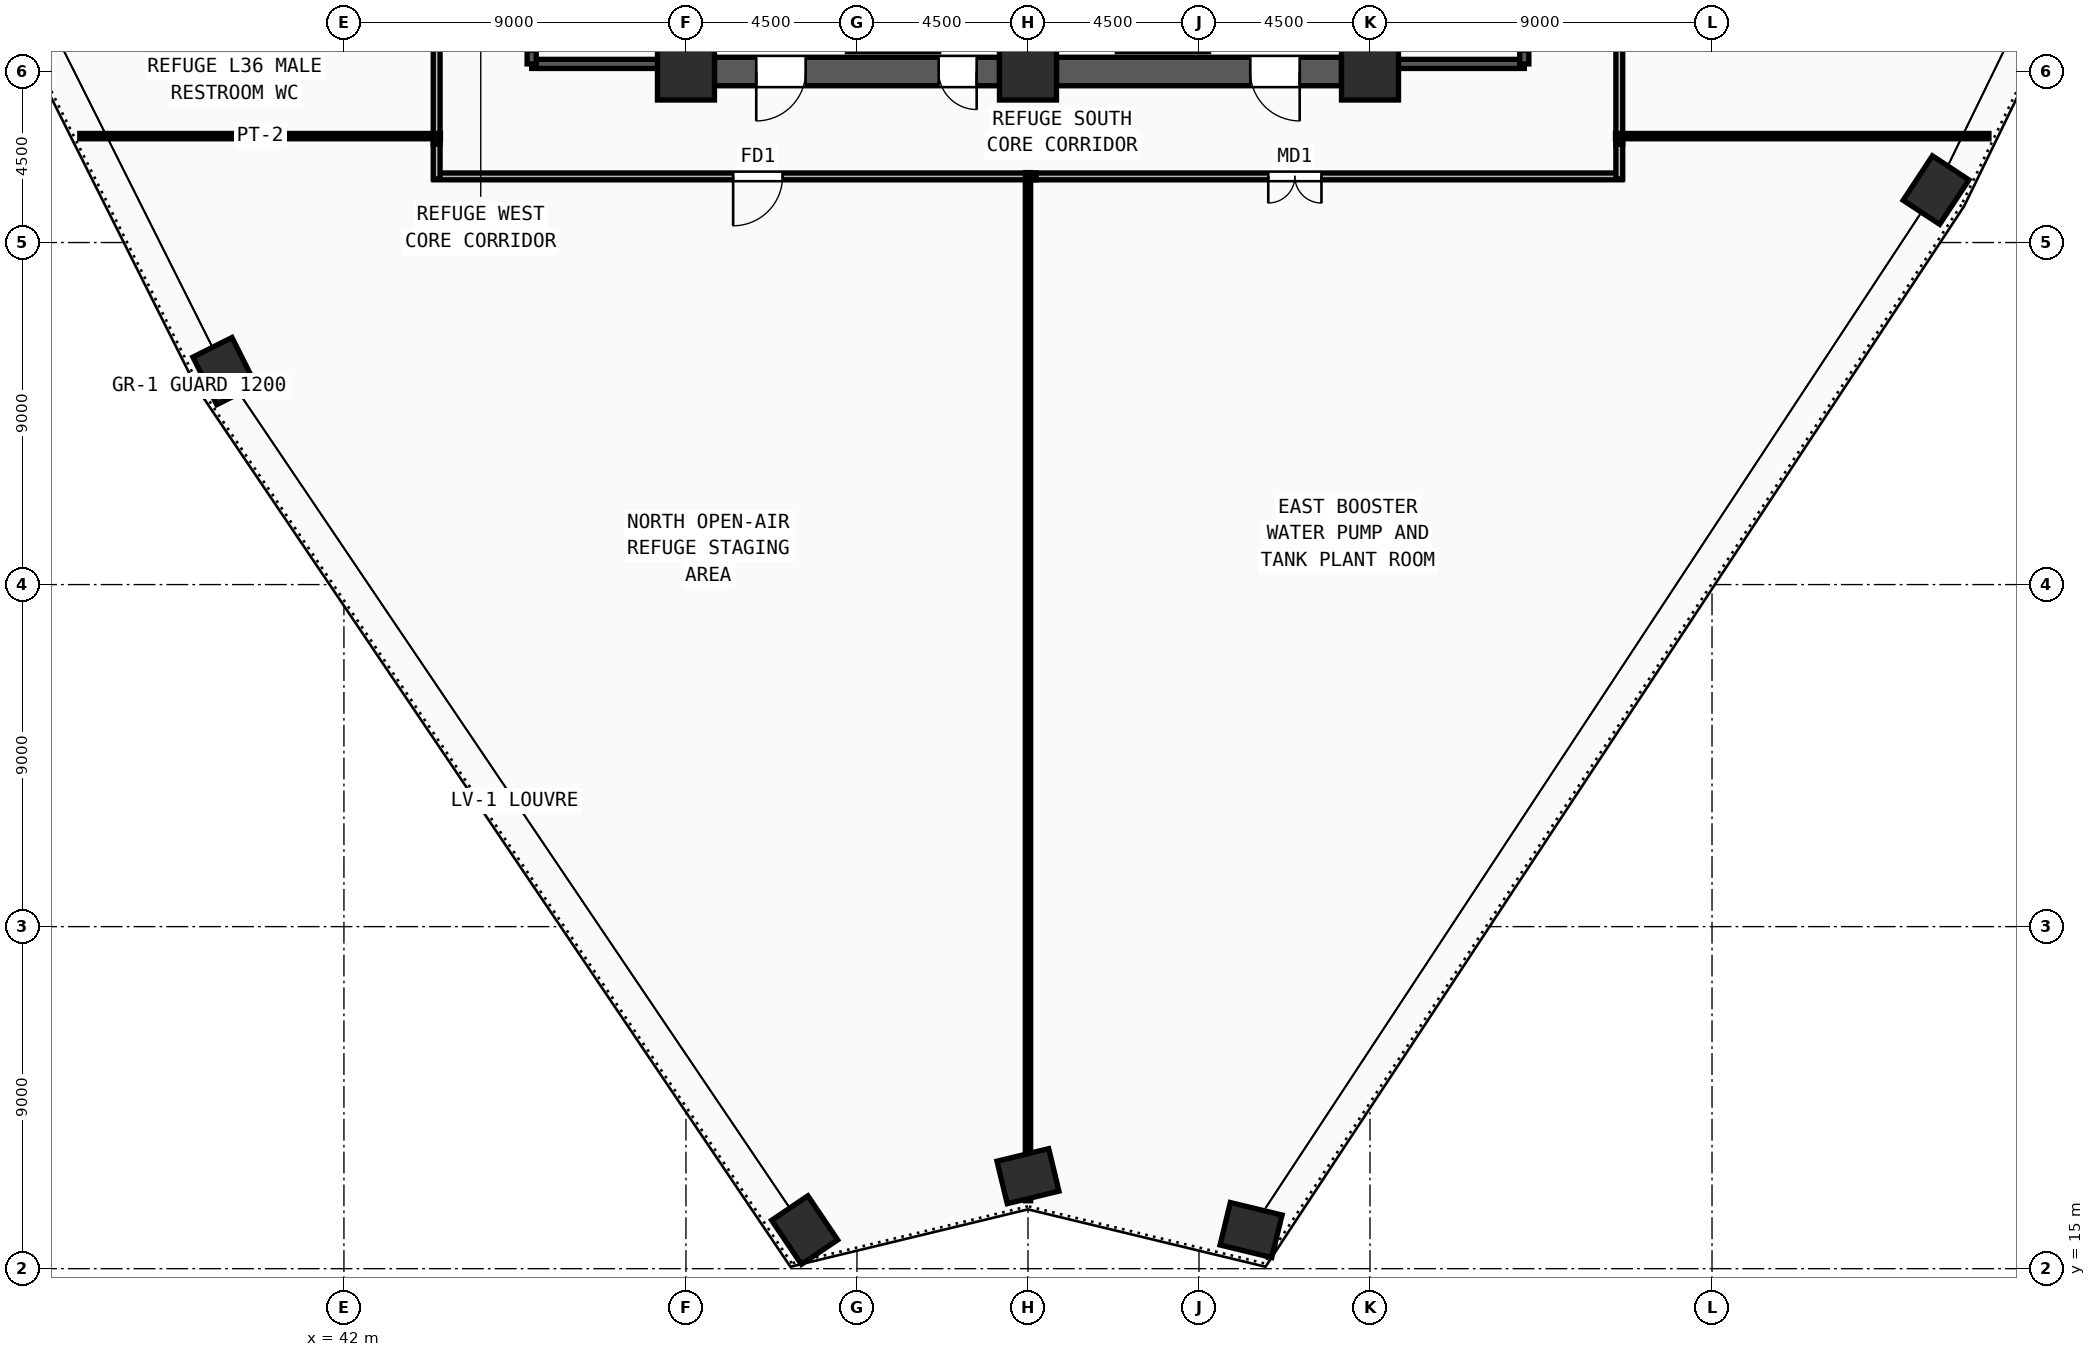
"""IFC4 building model, lengths in metres.
Left out: names, types, materials, properties, quantities, classifications, styles, units other than length and angle.
Written with IfcOpenShell. Run it as: python <this file> out.ifc"""

import sys

from ifc_helpers import new_model, si_unit, direction, frame, frame_2d, origin, origin_2d, place, context, subcontext, project, spatial, rectangle, extrude, source, transform, mapped, element, fill, save


model = new_model("IFC4")
c1 = context("Model", 3, precision=1e-05, world=origin(), true_north=direction((0.0, 1.0)))
c2 = subcontext(c1, "Body", "Model", "MODEL_VIEW")
j1 = project(units=[si_unit("LENGTHUNIT", "METRE"), si_unit("PLANEANGLEUNIT", "RADIAN")], contexts=[c1])
p1 = place(None, origin())
s1 = spatial("IfcSite", under=j1, at=p1, CompositionType="ELEMENT")
p2 = place(p1, origin())
s2 = spatial("IfcBuilding", under=s1, at=p2, CompositionType="ELEMENT")
p3 = place(p2, frame((0.0, 0.0, 139.5)))
s3 = spatial("IfcBuildingStorey", under=s2, at=p3, CompositionType="ELEMENT", Elevation=139.5)
m1 = source(origin(), c2, "Body", "SweptSolid", [
    extrude(rectangle(XDim=1.5, YDim=1.5, at=origin_2d()), origin(), (0.0, 0.0, 1.0), 4.5),
])
for number, where, z_axis, x_axis in (
    (1, (51.0, 46.5, 0.0), (0.0, 0.0, 1.0), (1.0, 0.0, 0.0)),
    (2, (60.0, 46.5, 0.0), (0.0, 0.0, 1.0), (1.0, 0.0, 0.0)),
    (3, (69.0, 46.5, 0.0), (0.0, 0.0, 1.0), (1.0, 0.0, 0.0)),
):
    element("IfcColumn", number, at=place(p3, frame(where, z_axis=z_axis, x_axis=x_axis)), inside=s3, PredefinedType="COLUMN", context=c2, shape_type="MappedRepresentation", body=[
        mapped(m1, transform((0.0, 0.0, 0.0), x_axis=(1.0, 0.0, 0.0), y_axis=(0.0, 1.0, 0.0), z_axis=(0.0, 0.0, 1.0), scale=1.0)),
    ])
m2 = source(origin(), c2, "Body", "SweptSolid", [
    extrude(rectangle(XDim=1.4, YDim=1.15, at=origin_2d()), origin(), (0.0, 0.0, 1.0), 4.5),
])
for number, where, z_axis, x_axis in (
    (4, (54.123, 16.015, 0.0), (0.0, 0.0, 1.0), (-0.56, 0.829, 0.0)),
    (5, (38.854, 38.617, 0.0), (0.0, 0.0, 1.0), (-0.448, 0.894, 0.0)),
    (6, (83.895, 43.38, 0.0), (0.0, 0.0, 1.0), (0.55, 0.835, 0.0)),
    (7, (65.87, 16.017, 0.0), (0.0, 0.0, 1.0), (-0.972, 0.235, 0.0)),
    (8, (60.0, 17.434, 0.0), (0.0, 0.0, 1.0), (0.972, 0.235, 0.0)),
):
    element("IfcColumn", number, at=place(p3, frame(where, z_axis=z_axis, x_axis=x_axis)), inside=s3, PredefinedType="COLUMN", context=c2, shape_type="MappedRepresentation", body=[
        mapped(m2, transform((0.0, 0.0, 0.0), x_axis=(1.0, 0.0, 0.0), y_axis=(0.0, 1.0, 0.0), z_axis=(0.0, 0.0, 1.0), scale=1.0)),
    ])
p4 = place(p3, frame((68.25, 46.5, 0.0), z_axis=(0.0, 0.0, 1.0), x_axis=(-1.0, 0.0, 0.0)))
e9 = element("IfcWall", 9, at=p4, inside=s3, PredefinedType="SHEAR", context=c2, shape_type="SweptSolid", body=[
    extrude(rectangle(XDim=7.5, YDim=0.75, at=frame_2d((3.75, 0.0))), origin(), (0.0, 0.0, 1.0), 4.32),
])
m3 = source(origin(), c2, "Body", "SweptSolid", [
    extrude(rectangle(XDim=1.3, YDim=2.2, at=frame_2d((0.65, 1.1))), frame((0.0, 0.385, 0.0), z_axis=(0.0, -1.0, 0.0), x_axis=(1.0, 0.0, 0.0)), (0.0, 0.0, 1.0), 0.77),
])
p5 = place(p4, frame((1.1, 0.0, 0.0)))
e10 = element("IfcOpeningElement", 10, at=p5, cuts=e9, PredefinedType="OPENING", context=c2, shape_type="MappedRepresentation", body=[
    mapped(m3, transform((0.0, 0.0, 0.0), x_axis=(1.0, 0.0, 0.0), y_axis=(0.0, 1.0, 0.0), z_axis=(0.0, 0.0, 1.0), scale=1.0)),
])
p6 = place(p3, frame((59.25, 46.5, 0.0), z_axis=(0.0, 0.0, 1.0), x_axis=(-1.0, 0.0, 0.0)))
e11 = element("IfcWall", 11, at=p6, inside=s3, PredefinedType="SHEAR", context=c2, shape_type="SweptSolid", body=[
    extrude(rectangle(XDim=7.5, YDim=0.75, at=frame_2d((3.75, 0.0))), origin(), (0.0, 0.0, 1.0), 4.32),
])
p7 = place(p6, frame((5.1, 0.0, 0.0)))
e12 = element("IfcOpeningElement", 12, at=p7, cuts=e11, PredefinedType="OPENING", context=c2, shape_type="MappedRepresentation", body=[
    mapped(m3, transform((0.0, 0.0, 0.0), x_axis=(1.0, 0.0, 0.0), y_axis=(0.0, 1.0, 0.0), z_axis=(0.0, 0.0, 1.0), scale=1.0)),
])
m4 = source(origin(), c2, "Body", "SweptSolid", [
    extrude(rectangle(XDim=1.0, YDim=2.2, at=frame_2d((0.5, 1.1))), frame((0.0, 0.385, 0.0), z_axis=(0.0, -1.0, 0.0), x_axis=(1.0, 0.0, 0.0)), (0.0, 0.0, 1.0), 0.77),
])
p8 = place(p6, frame((0.6, 0.0, 0.0)))
e13 = element("IfcOpeningElement", 13, at=p8, cuts=e11, PredefinedType="OPENING", context=c2, shape_type="MappedRepresentation", body=[
    mapped(m4, transform((0.0, 0.0, 0.0), x_axis=(1.0, 0.0, 0.0), y_axis=(0.0, 1.0, 0.0), z_axis=(0.0, 0.0, 1.0), scale=1.0)),
])
p9 = place(p3, frame((46.94, 46.7, 0.0), z_axis=(0.0, 0.0, 1.0), x_axis=(1.0, 0.0, 0.0)))
e14 = element("IfcWall", 14, at=p9, inside=s3, PredefinedType="SOLIDWALL", context=c2, shape_type="SweptSolid", body=[
    extrude(rectangle(XDim=3.44, YDim=0.24, at=frame_2d((1.72, 0.0))), origin(), (0.0, 0.0, 1.0), 4.32),
])
p10 = place(p3, frame((50.38, 46.7, 0.0), z_axis=(0.0, 0.0, 1.0), x_axis=(0.0, 1.0, 0.0)))
e15 = element("IfcWall", 15, at=p10, inside=s3, PredefinedType="SOLIDWALL", context=c2, shape_type="SweptSolid", body=[
    extrude(rectangle(XDim=7.82, YDim=0.24, at=frame_2d((3.91, 0.0))), origin(), (0.0, 0.0, 1.0), 4.32),
])
p11 = place(p3, frame((46.94, 54.52, 0.0), z_axis=(0.0, 0.0, 1.0), x_axis=(0.0, -1.0, 0.0)))
e16 = element("IfcWall", 16, at=p11, inside=s3, PredefinedType="SOLIDWALL", context=c2, shape_type="SweptSolid", body=[
    extrude(rectangle(XDim=7.82, YDim=0.24, at=frame_2d((3.91, 0.0))), origin(), (0.0, 0.0, 1.0), 4.32),
])
m5 = source(origin(), c2, "Body", "SweptSolid", [
    extrude(rectangle(XDim=1.2, YDim=2.2, at=frame_2d((0.6, 1.1))), frame((0.0, 0.13, 0.0), z_axis=(0.0, -1.0, 0.0), x_axis=(1.0, 0.0, 0.0)), (0.0, 0.0, 1.0), 0.26),
])
p12 = place(p11, frame((6.3, 0.0, 0.0)))
e17 = element("IfcOpeningElement", 17, at=p12, cuts=e16, PredefinedType="OPENING", context=c2, shape_type="MappedRepresentation", body=[
    mapped(m5, transform((0.0, 0.0, 0.0), x_axis=(1.0, 0.0, 0.0), y_axis=(0.0, 1.0, 0.0), z_axis=(0.0, 0.0, 1.0), scale=1.0)),
])
p13 = place(p3, frame((69.62, 46.7, 0.0), z_axis=(0.0, 0.0, 1.0), x_axis=(1.0, 0.0, 0.0)))
e18 = element("IfcWall", 18, at=p13, inside=s3, PredefinedType="SOLIDWALL", context=c2, shape_type="SweptSolid", body=[
    extrude(rectangle(XDim=3.44, YDim=0.24, at=frame_2d((1.72, 0.0))), origin(), (0.0, 0.0, 1.0), 4.32),
])
p14 = place(p3, frame((73.06, 46.7, 0.0), z_axis=(0.0, 0.0, 1.0), x_axis=(0.0, 1.0, 0.0)))
e19 = element("IfcWall", 19, at=p14, inside=s3, PredefinedType="SOLIDWALL", context=c2, shape_type="SweptSolid", body=[
    extrude(rectangle(XDim=7.82, YDim=0.24, at=frame_2d((3.91, 0.0))), origin(), (0.0, 0.0, 1.0), 4.32),
])
p15 = place(p14, frame((0.32, 0.0, 0.0)))
e20 = element("IfcOpeningElement", 20, at=p15, cuts=e19, PredefinedType="OPENING", context=c2, shape_type="MappedRepresentation", body=[
    mapped(m5, transform((0.0, 0.0, 0.0), x_axis=(1.0, 0.0, 0.0), y_axis=(0.0, 1.0, 0.0), z_axis=(0.0, 0.0, 1.0), scale=1.0)),
])
p16 = place(p3, frame((69.62, 54.52, 0.0), z_axis=(0.0, 0.0, 1.0), x_axis=(0.0, -1.0, 0.0)))
e21 = element("IfcWall", 21, at=p16, inside=s3, PredefinedType="SOLIDWALL", context=c2, shape_type="SweptSolid", body=[
    extrude(rectangle(XDim=7.82, YDim=0.24, at=frame_2d((3.91, 0.0))), origin(), (0.0, 0.0, 1.0), 4.32),
])
p17 = place(p3, frame((75.56, 67.015, 0.0), z_axis=(0.0, 0.0, 1.0), x_axis=(0.0, -1.0, 0.0)))
e22 = element("IfcWall", 22, at=p17, inside=s3, PredefinedType="PARTITIONING", context=c2, shape_type="SweptSolid", body=[
    extrude(rectangle(XDim=22.43, YDim=0.18, at=frame_2d((11.215, 0.0))), origin(), (0.0, 0.0, 1.0), 3.905),
])
m6 = source(origin(), c2, "Body", "SweptSolid", [
    extrude(rectangle(XDim=1.3, YDim=2.2, at=frame_2d((0.65, 1.1))), frame((0.0, 0.1, 0.0), z_axis=(0.0, -1.0, 0.0), x_axis=(1.0, 0.0, 0.0)), (0.0, 0.0, 1.0), 0.2),
])
p18 = place(p17, frame((10.565, 0.0, 0.0)))
e23 = element("IfcOpeningElement", 23, at=p18, cuts=e22, PredefinedType="OPENING", context=c2, shape_type="MappedRepresentation", body=[
    mapped(m6, transform((0.0, 0.0, 0.0), x_axis=(1.0, 0.0, 0.0), y_axis=(0.0, 1.0, 0.0), z_axis=(0.0, 0.0, 1.0), scale=1.0)),
])
p19 = place(p3, frame((60.215, 43.74, 0.0), z_axis=(0.0, 0.0, 1.0), x_axis=(-1.0, 0.0, 0.0)))
e24 = element("IfcWall", 24, at=p19, inside=s3, PredefinedType="PARTITIONING", context=c2, shape_type="SweptSolid", body=[
    extrude(rectangle(XDim=15.845, YDim=0.18, at=frame_2d((7.922, 0.0))), origin(), (0.0, 0.0, 1.0), 4.32),
])
p20 = place(p19, frame((6.673, 0.0, 0.0)))
e25 = element("IfcOpeningElement", 25, at=p20, cuts=e24, PredefinedType="OPENING", context=c2, shape_type="MappedRepresentation", body=[
    mapped(m6, transform((0.0, 0.0, 0.0), x_axis=(1.0, 0.0, 0.0), y_axis=(0.0, 1.0, 0.0), z_axis=(0.0, 0.0, 1.0), scale=1.0)),
])
p21 = place(p3, frame((75.63, 43.74, 0.0), z_axis=(0.0, 0.0, 1.0), x_axis=(-1.0, 0.0, 0.0)))
e26 = element("IfcWall", 26, at=p21, inside=s3, PredefinedType="PARTITIONING", context=c2, shape_type="SweptSolid", body=[
    extrude(rectangle(XDim=15.415, YDim=0.18, at=frame_2d((7.708, 0.0))), origin(), (0.0, 0.0, 1.0), 4.32),
])
m7 = source(origin(), c2, "Body", "SweptSolid", [
    extrude(rectangle(XDim=1.4, YDim=2.25, at=frame_2d((0.7, 1.125))), frame((0.0, 0.1, 0.0), z_axis=(0.0, -1.0, 0.0), x_axis=(1.0, 0.0, 0.0)), (0.0, 0.0, 1.0), 0.2),
])
p22 = place(p21, frame((7.907, 0.0, 0.0)))
e27 = element("IfcOpeningElement", 27, at=p22, cuts=e26, PredefinedType="OPENING", context=c2, shape_type="MappedRepresentation", body=[
    mapped(m7, transform((0.0, 0.0, 0.0), x_axis=(1.0, 0.0, 0.0), y_axis=(0.0, 1.0, 0.0), z_axis=(0.0, 0.0, 1.0), scale=1.0)),
])
p23 = place(p3, frame((44.44, 44.585, 0.0), z_axis=(0.0, 0.0, 1.0), x_axis=(0.0, 1.0, 0.0)))
e28 = element("IfcWall", 28, at=p23, inside=s3, PredefinedType="PARTITIONING", context=c2, shape_type="SweptSolid", body=[
    extrude(rectangle(XDim=2.755, YDim=0.18, at=frame_2d((1.377, 0.0))), origin(), (0.0, 0.0, 1.0), 4.32),
])
for number, where, z_axis, x_axis in (
    (29, (44.44, 43.67, 0.0), (0.0, 0.0, 1.0), (0.0, 1.0, 0.0)),
    (30, (75.56, 44.585, 0.0), (0.0, 0.0, 1.0), (0.0, -1.0, 0.0)),
):
    element("IfcWall", number, at=place(p3, frame(where, z_axis=z_axis, x_axis=x_axis)), inside=s3, PredefinedType="PARTITIONING", context=c2, shape_type="SweptSolid", body=[
        extrude(rectangle(XDim=0.915, YDim=0.18, at=frame_2d((0.458, 0.0))), origin(), (0.0, 0.0, 1.0), 4.32),
    ])
p24 = place(p3, frame((44.54, 44.8, 0.0), z_axis=(0.0, 0.0, 1.0), x_axis=(-1.0, 0.0, 0.0)))
e31 = element("IfcWall", 31, at=p24, inside=s3, PredefinedType="PARTITIONING", context=c2, shape_type="SweptSolid", body=[
    extrude(rectangle(XDim=9.49, YDim=0.14, at=frame_2d((4.745, 0.0))), origin(), (0.0, 0.0, 1.0), 4.32),
])
p25 = place(p3, frame((75.46, 44.8, 0.0), z_axis=(0.0, 0.0, 1.0), x_axis=(1.0, 0.0, 0.0)))
e32 = element("IfcWall", 32, at=p25, inside=s3, PredefinedType="PARTITIONING", context=c2, shape_type="SweptSolid", body=[
    extrude(rectangle(XDim=9.827, YDim=0.14, at=frame_2d((4.914, 0.0))), origin(), (0.0, 0.0, 1.0), 4.32),
])
p26 = place(p3, frame((60.0, 43.84, 0.0), z_axis=(0.0, 0.0, 1.0), x_axis=(0.0, -1.0, 0.0)))
e33 = element("IfcWall", 33, at=p26, inside=s3, PredefinedType="PARTITIONING", context=c2, shape_type="SweptSolid", body=[
    extrude(rectangle(XDim=27.054, YDim=0.14, at=frame_2d((13.527, 0.0))), origin(), (0.0, 0.0, 1.0), 4.32),
])
m8 = source(origin(), c2, "Body", "SweptSolid", [
    extrude(rectangle(XDim=1.3, YDim=2.2, at=frame_2d((0.65, 1.1))), frame((0.0, 0.025, 0.0), z_axis=(0.0, -1.0, 0.0), x_axis=(1.0, 0.0, 0.0)), (0.0, 0.0, 1.0), 0.05),
])
p27 = place(p7, origin())
e34 = element("IfcDoor", 34, at=p27, inside=s3, OperationType="SINGLE_SWING_RIGHT", PredefinedType="DOOR", context=c2, shape_type="MappedRepresentation", body=[
    mapped(m8, transform((0.0, 0.0, 0.0), x_axis=(1.0, 0.0, 0.0), y_axis=(0.0, 1.0, 0.0), z_axis=(0.0, 0.0, 1.0), scale=1.0)),
])
fill(e12, e34)
m9 = source(origin(), c2, "Body", "SweptSolid", [
    extrude(rectangle(XDim=1.0, YDim=2.2, at=frame_2d((0.5, 1.1))), frame((0.0, 0.025, 0.0), z_axis=(0.0, -1.0, 0.0), x_axis=(1.0, 0.0, 0.0)), (0.0, 0.0, 1.0), 0.05),
])
p28 = place(p8, origin())
e35 = element("IfcDoor", 35, at=p28, inside=s3, OperationType="SINGLE_SWING_LEFT", PredefinedType="DOOR", context=c2, shape_type="MappedRepresentation", body=[
    mapped(m9, transform((0.0, 0.0, 0.0), x_axis=(1.0, 0.0, 0.0), y_axis=(0.0, 1.0, 0.0), z_axis=(0.0, 0.0, 1.0), scale=1.0)),
])
fill(e13, e35)
p29 = place(p5, origin())
e36 = element("IfcDoor", 36, at=p29, inside=s3, OperationType="SINGLE_SWING_LEFT", PredefinedType="DOOR", context=c2, shape_type="MappedRepresentation", body=[
    mapped(m8, transform((0.0, 0.0, 0.0), x_axis=(1.0, 0.0, 0.0), y_axis=(0.0, 1.0, 0.0), z_axis=(0.0, 0.0, 1.0), scale=1.0)),
])
fill(e10, e36)
p30 = place(p20, origin())
e37 = element("IfcDoor", 37, at=p30, inside=s3, OperationType="SINGLE_SWING_RIGHT", PredefinedType="DOOR", context=c2, shape_type="MappedRepresentation", body=[
    mapped(m8, transform((0.0, 0.0, 0.0), x_axis=(1.0, 0.0, 0.0), y_axis=(0.0, 1.0, 0.0), z_axis=(0.0, 0.0, 1.0), scale=1.0)),
])
fill(e25, e37)
m10 = source(origin(), c2, "Body", "SweptSolid", [
    extrude(rectangle(XDim=1.4, YDim=2.25, at=frame_2d((0.7, 1.125))), frame((0.0, 0.025, 0.0), z_axis=(0.0, -1.0, 0.0), x_axis=(1.0, 0.0, 0.0)), (0.0, 0.0, 1.0), 0.05),
])
p31 = place(p22, origin())
e38 = element("IfcDoor", 38, at=p31, inside=s3, OperationType="DOUBLE_DOOR_SINGLE_SWING", PredefinedType="DOOR", context=c2, shape_type="MappedRepresentation", body=[
    mapped(m10, transform((0.0, 0.0, 0.0), x_axis=(1.0, 0.0, 0.0), y_axis=(0.0, 1.0, 0.0), z_axis=(0.0, 0.0, 1.0), scale=1.0)),
])
fill(e27, e38)
save(model, sys.argv[1])
